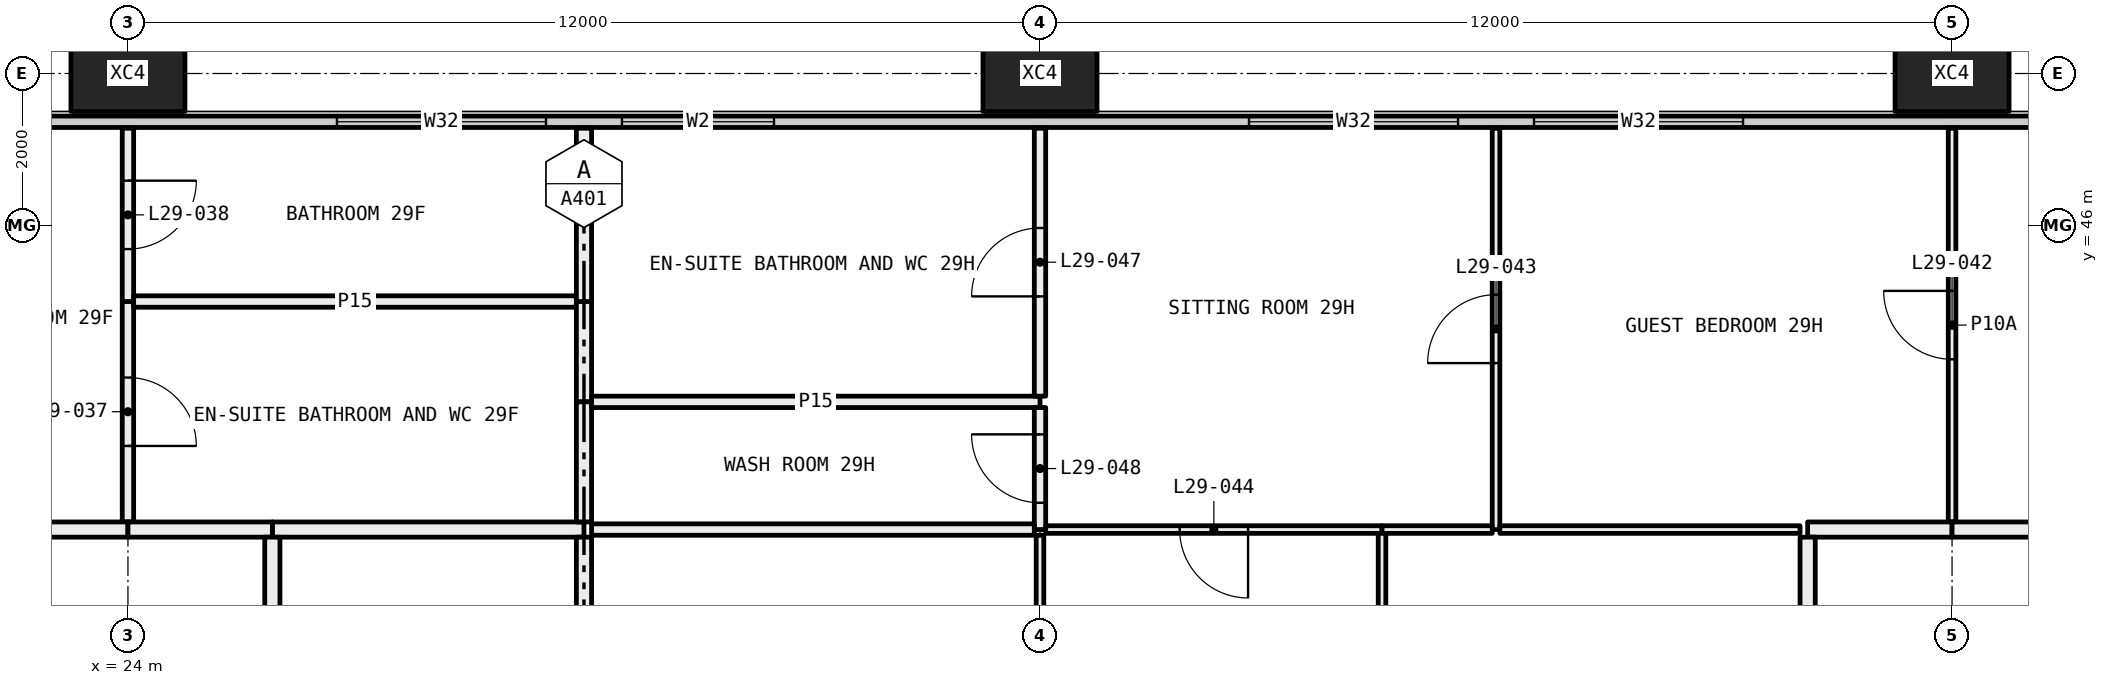
"""IFC4 building model, lengths in metres.
Left out: names, types, materials, properties, quantities, classifications, styles, units other than length and angle.
Written with IfcOpenShell. Run it as: python <this file> out.ifc"""

import sys

from ifc_helpers import new_model, si_unit, direction, frame, frame_2d, origin, origin_2d, place, context, subcontext, project, spatial, rectangle, hollow_rectangle, extrude, element, fill, save


model = new_model("IFC4")
c1 = context("Model", 3, precision=1e-05, world=origin(), true_north=direction((0.0, 1.0)))
c2 = subcontext(c1, "Body", "Model", "MODEL_VIEW")
j1 = project(units=[si_unit("LENGTHUNIT", "METRE"), si_unit("PLANEANGLEUNIT", "RADIAN")], contexts=[c1])
p1 = place(None, origin())
s1 = spatial("IfcSite", under=j1, at=p1, CompositionType="ELEMENT")
p2 = place(p1, origin())
s2 = spatial("IfcBuilding", under=s1, at=p2, CompositionType="ELEMENT")
p3 = place(p2, frame((0.0, 0.0, 113.85)))
s3 = spatial("IfcBuildingStorey", under=s2, at=p3, CompositionType="ELEMENT", Elevation=113.85)
for number, where, z_axis, x_axis in (
    (1, (24.0, 48.0, -0.4), (0.0, 0.0, 1.0), (1.0, 0.0, 0.0)),
    (2, (36.0, 48.0, -0.4), (0.0, 0.0, 1.0), (1.0, 0.0, 0.0)),
    (3, (48.0, 48.0, -0.4), (0.0, 0.0, 1.0), (1.0, 0.0, 0.0)),
):
    element("IfcColumn", number, at=place(p3, frame(where, z_axis=z_axis, x_axis=x_axis)), inside=s3, PredefinedType="COLUMN", context=c2, shape_type="SweptSolid", body=[
        extrude(hollow_rectangle(XDim=1.5, YDim=1.0, WallThickness=0.06, at=origin_2d()), origin(), (0.0, 0.0, 1.0), 3.45),
    ])
p4 = place(p3, frame((6.56, 47.365, 0.0), z_axis=(0.0, 0.0, 1.0), x_axis=(1.0, 0.0, 0.0)))
e4 = element("IfcWall", 4, at=p4, inside=s3, PredefinedType="ELEMENTEDWALL", context=c2, shape_type="SweptSolid", body=[
    extrude(rectangle(XDim=58.88, YDim=0.15, at=frame_2d((29.44, 0.0))), origin(), (0.0, 0.0, 1.0), 3.05),
])
p5 = place(p4, frame((0.44, 0.0, 0.45)))
e5 = element("IfcOpeningElement", 5, at=p5, cuts=e4, PredefinedType="OPENING", context=c2, shape_type="SweptSolid", body=[
    extrude(rectangle(XDim=4.5, YDim=2.55, at=frame_2d((2.25, 1.275))), frame((0.0, 0.085, 0.0), z_axis=(0.0, -1.0, 0.0), x_axis=(1.0, 0.0, 0.0)), (0.0, 0.0, 1.0), 0.17),
])
p6 = place(p4, frame((8.19, 0.0, 0.45)))
e6 = element("IfcOpeningElement", 6, at=p6, cuts=e4, PredefinedType="OPENING", context=c2, shape_type="SweptSolid", body=[
    extrude(rectangle(XDim=2.75, YDim=2.55, at=frame_2d((1.375, 1.275))), frame((0.0, 0.085, 0.0), z_axis=(0.0, -1.0, 0.0), x_axis=(1.0, 0.0, 0.0)), (0.0, 0.0, 1.0), 0.17),
])
p7 = place(p4, frame((11.94, 0.0, 0.45)))
e7 = element("IfcOpeningElement", 7, at=p7, cuts=e4, PredefinedType="OPENING", context=c2, shape_type="SweptSolid", body=[
    extrude(rectangle(XDim=2.75, YDim=2.55, at=frame_2d((1.375, 1.275))), frame((0.0, 0.085, 0.0), z_axis=(0.0, -1.0, 0.0), x_axis=(1.0, 0.0, 0.0)), (0.0, 0.0, 1.0), 0.17),
])
p8 = place(p4, frame((20.19, 0.0, 0.45)))
e8 = element("IfcOpeningElement", 8, at=p8, cuts=e4, PredefinedType="OPENING", context=c2, shape_type="SweptSolid", body=[
    extrude(rectangle(XDim=2.75, YDim=2.55, at=frame_2d((1.375, 1.275))), frame((0.0, 0.085, 0.0), z_axis=(0.0, -1.0, 0.0), x_axis=(1.0, 0.0, 0.0)), (0.0, 0.0, 1.0), 0.17),
])
p9 = place(p4, frame((23.94, 0.0, 0.45)))
e9 = element("IfcOpeningElement", 9, at=p9, cuts=e4, PredefinedType="OPENING", context=c2, shape_type="SweptSolid", body=[
    extrude(rectangle(XDim=2.0, YDim=2.55, at=frame_2d((1.0, 1.275))), frame((0.0, 0.085, 0.0), z_axis=(0.0, -1.0, 0.0), x_axis=(1.0, 0.0, 0.0)), (0.0, 0.0, 1.0), 0.17),
])
p10 = place(p4, frame((32.19, 0.0, 0.45)))
e10 = element("IfcOpeningElement", 10, at=p10, cuts=e4, PredefinedType="OPENING", context=c2, shape_type="SweptSolid", body=[
    extrude(rectangle(XDim=2.75, YDim=2.55, at=frame_2d((1.375, 1.275))), frame((0.0, 0.085, 0.0), z_axis=(0.0, -1.0, 0.0), x_axis=(1.0, 0.0, 0.0)), (0.0, 0.0, 1.0), 0.17),
])
p11 = place(p4, frame((35.94, 0.0, 0.45)))
e11 = element("IfcOpeningElement", 11, at=p11, cuts=e4, PredefinedType="OPENING", context=c2, shape_type="SweptSolid", body=[
    extrude(rectangle(XDim=2.75, YDim=2.55, at=frame_2d((1.375, 1.275))), frame((0.0, 0.085, 0.0), z_axis=(0.0, -1.0, 0.0), x_axis=(1.0, 0.0, 0.0)), (0.0, 0.0, 1.0), 0.17),
])
p12 = place(p4, frame((44.19, 0.0, 0.45)))
e12 = element("IfcOpeningElement", 12, at=p12, cuts=e4, PredefinedType="OPENING", context=c2, shape_type="SweptSolid", body=[
    extrude(rectangle(XDim=2.75, YDim=2.55, at=frame_2d((1.375, 1.275))), frame((0.0, 0.085, 0.0), z_axis=(0.0, -1.0, 0.0), x_axis=(1.0, 0.0, 0.0)), (0.0, 0.0, 1.0), 0.17),
])
p13 = place(p4, frame((47.94, 0.0, 0.45)))
e13 = element("IfcOpeningElement", 13, at=p13, cuts=e4, PredefinedType="OPENING", context=c2, shape_type="SweptSolid", body=[
    extrude(rectangle(XDim=2.0, YDim=2.55, at=frame_2d((1.0, 1.275))), frame((0.0, 0.085, 0.0), z_axis=(0.0, -1.0, 0.0), x_axis=(1.0, 0.0, 0.0)), (0.0, 0.0, 1.0), 0.17),
])
p14 = place(p4, frame((53.94, 0.0, 0.45)))
e14 = element("IfcOpeningElement", 14, at=p14, cuts=e4, PredefinedType="OPENING", context=c2, shape_type="SweptSolid", body=[
    extrude(rectangle(XDim=4.5, YDim=2.55, at=frame_2d((2.25, 1.275))), frame((0.0, 0.085, 0.0), z_axis=(0.0, -1.0, 0.0), x_axis=(1.0, 0.0, 0.0)), (0.0, 0.0, 1.0), 0.17),
])
p15 = place(p3, frame((24.0, 42.1, 0.0), z_axis=(0.0, 0.0, 1.0), x_axis=(0.0, 1.0, 0.0)))
e15 = element("IfcWall", 15, at=p15, inside=s3, PredefinedType="PARTITIONING", context=c2, shape_type="SweptSolid", body=[
    extrude(rectangle(XDim=2.9, YDim=0.15, at=frame_2d((1.45, 0.0))), origin(), (0.0, 0.0, 1.0), 3.05),
])
p16 = place(p15, frame((1.0, 0.0, 0.0)))
e16 = element("IfcOpeningElement", 16, at=p16, cuts=e15, PredefinedType="OPENING", context=c2, shape_type="SweptSolid", body=[
    extrude(rectangle(XDim=0.9, YDim=2.1, at=frame_2d((0.45, 1.05))), frame((0.0, 0.085, 0.0), z_axis=(0.0, -1.0, 0.0), x_axis=(1.0, 0.0, 0.0)), (0.0, 0.0, 1.0), 0.17),
])
p17 = place(p3, frame((24.0, 45.0, 0.0), z_axis=(0.0, 0.0, 1.0), x_axis=(0.0, 1.0, 0.0)))
e17 = element("IfcWall", 17, at=p17, inside=s3, PredefinedType="PARTITIONING", context=c2, shape_type="SweptSolid", body=[
    extrude(rectangle(XDim=2.28, YDim=0.15, at=frame_2d((1.14, 0.0))), origin(), (0.0, 0.0, 1.0), 3.05),
])
p18 = place(p17, frame((0.69, 0.0, 0.0)))
e18 = element("IfcOpeningElement", 18, at=p18, cuts=e17, PredefinedType="OPENING", context=c2, shape_type="SweptSolid", body=[
    extrude(rectangle(XDim=0.9, YDim=2.1, at=frame_2d((0.45, 1.05))), frame((0.0, 0.085, 0.0), z_axis=(0.0, -1.0, 0.0), x_axis=(1.0, 0.0, 0.0)), (0.0, 0.0, 1.0), 0.17),
])
p19 = place(p3, frame((18.0, 42.0, 0.0), z_axis=(0.0, 0.0, 1.0), x_axis=(1.0, 0.0, 0.0)))
e19 = element("IfcWall", 19, at=p19, inside=s3, PredefinedType="PARTITIONING", context=c2, shape_type="SweptSolid", body=[
    extrude(rectangle(XDim=6.0, YDim=0.2, at=frame_2d((3.0, 0.0))), origin(), (0.0, 0.0, 1.0), 3.05),
])
p20 = place(p3, frame((29.9, 45.0, 0.0), z_axis=(0.0, 0.0, 1.0), x_axis=(-1.0, 0.0, 0.0)))
e20 = element("IfcWall", 20, at=p20, inside=s3, PredefinedType="PARTITIONING", context=c2, shape_type="SweptSolid", body=[
    extrude(rectangle(XDim=5.825, YDim=0.15, at=frame_2d((2.913, 0.0))), origin(), (0.0, 0.0, 1.0), 3.05),
])
p21 = place(p3, frame((25.9, 42.0, 0.0), z_axis=(0.0, 0.0, 1.0), x_axis=(1.0, 0.0, 0.0)))
e21 = element("IfcWall", 21, at=p21, inside=s3, PredefinedType="PARTITIONING", context=c2, shape_type="SweptSolid", body=[
    extrude(rectangle(XDim=4.1, YDim=0.2, at=frame_2d((2.05, 0.0))), origin(), (0.0, 0.0, 1.0), 3.05),
])
p22 = place(p3, frame((30.0, 43.68, 0.0), z_axis=(0.0, 0.0, 1.0), x_axis=(0.0, 1.0, 0.0)))
e22 = element("IfcWall", 22, at=p22, inside=s3, PredefinedType="PARTITIONING", context=c2, shape_type="SweptSolid", body=[
    extrude(rectangle(XDim=1.32, YDim=0.2, at=frame_2d((0.66, 0.0))), origin(), (0.0, 0.0, 1.0), 3.05),
])
p23 = place(p3, frame((30.0, 42.1, 0.0), z_axis=(0.0, 0.0, 1.0), x_axis=(0.0, 1.0, 0.0)))
e23 = element("IfcWall", 23, at=p23, inside=s3, PredefinedType="PARTITIONING", context=c2, shape_type="SweptSolid", body=[
    extrude(rectangle(XDim=1.58, YDim=0.2, at=frame_2d((0.79, 0.0))), origin(), (0.0, 0.0, 1.0), 3.05),
])
p24 = place(p3, frame((24.0, 42.0, 0.0), z_axis=(0.0, 0.0, 1.0), x_axis=(1.0, 0.0, 0.0)))
e24 = element("IfcWall", 24, at=p24, inside=s3, PredefinedType="PARTITIONING", context=c2, shape_type="SweptSolid", body=[
    extrude(rectangle(XDim=1.9, YDim=0.2, at=frame_2d((0.95, 0.0))), origin(), (0.0, 0.0, 1.0), 3.05),
])
p25 = place(p3, frame((30.0, 45.0, 0.0), z_axis=(0.0, 0.0, 1.0), x_axis=(0.0, 1.0, 0.0)))
e25 = element("IfcWall", 25, at=p25, inside=s3, PredefinedType="PARTITIONING", context=c2, shape_type="SweptSolid", body=[
    extrude(rectangle(XDim=2.28, YDim=0.2, at=frame_2d((1.14, 0.0))), origin(), (0.0, 0.0, 1.0), 3.05),
])
p26 = place(p3, frame((30.0, 36.1, 0.0), z_axis=(0.0, 0.0, 1.0), x_axis=(0.0, 1.0, 0.0)))
e26 = element("IfcWall", 26, at=p26, inside=s3, PredefinedType="PARTITIONING", context=c2, shape_type="SweptSolid", body=[
    extrude(rectangle(XDim=5.8, YDim=0.2, at=frame_2d((2.9, 0.0))), origin(), (0.0, 0.0, 1.0), 3.05),
])
p27 = place(p3, frame((25.9, 41.9, 0.0), z_axis=(0.0, 0.0, 1.0), x_axis=(0.0, -1.0, 0.0)))
e27 = element("IfcWall", 27, at=p27, inside=s3, PredefinedType="PARTITIONING", context=c2, shape_type="SweptSolid", body=[
    extrude(rectangle(XDim=6.0, YDim=0.2, at=frame_2d((3.0, 0.0))), origin(), (0.0, 0.0, 1.0), 2.45),
])
p28 = place(p27, frame((2.55, 0.0, 0.0)))
e28 = element("IfcOpeningElement", 28, at=p28, cuts=e27, PredefinedType="OPENING", context=c2, shape_type="SweptSolid", body=[
    extrude(rectangle(XDim=0.9, YDim=2.1, at=frame_2d((0.45, 1.05))), frame((0.0, 0.11, 0.0), z_axis=(0.0, -1.0, 0.0), x_axis=(1.0, 0.0, 0.0)), (0.0, 0.0, 1.0), 0.22),
])
p29 = place(p3, frame((30.1, 43.68, 0.0), z_axis=(0.0, 0.0, 1.0), x_axis=(1.0, 0.0, 0.0)))
e29 = element("IfcWall", 29, at=p29, inside=s3, PredefinedType="PARTITIONING", context=c2, shape_type="SweptSolid", body=[
    extrude(rectangle(XDim=5.9, YDim=0.15, at=frame_2d((2.95, 0.0))), origin(), (0.0, 0.0, 1.0), 2.45),
])
p30 = place(p3, frame((36.0, 43.755, 0.0), z_axis=(0.0, 0.0, 1.0), x_axis=(0.0, 1.0, 0.0)))
e30 = element("IfcWall", 30, at=p30, inside=s3, PredefinedType="PARTITIONING", context=c2, shape_type="SweptSolid", body=[
    extrude(rectangle(XDim=3.525, YDim=0.15, at=frame_2d((1.763, 0.0))), origin(), (0.0, 0.0, 1.0), 2.45),
])
p31 = place(p30, frame((1.312, 0.0, 0.0)))
e31 = element("IfcOpeningElement", 31, at=p31, cuts=e30, PredefinedType="OPENING", context=c2, shape_type="SweptSolid", body=[
    extrude(rectangle(XDim=0.9, YDim=2.1, at=frame_2d((0.45, 1.05))), frame((0.0, 0.085, 0.0), z_axis=(0.0, -1.0, 0.0), x_axis=(1.0, 0.0, 0.0)), (0.0, 0.0, 1.0), 0.17),
])
p32 = place(p3, frame((36.0, 42.0, 0.0), z_axis=(0.0, 0.0, 1.0), x_axis=(0.0, 1.0, 0.0)))
e32 = element("IfcWall", 32, at=p32, inside=s3, PredefinedType="PARTITIONING", context=c2, shape_type="SweptSolid", body=[
    extrude(rectangle(XDim=1.605, YDim=0.15, at=frame_2d((0.802, 0.0))), origin(), (0.0, 0.0, 1.0), 2.45),
])
p33 = place(p32, frame((0.353, 0.0, 0.0)))
e33 = element("IfcOpeningElement", 33, at=p33, cuts=e32, PredefinedType="OPENING", context=c2, shape_type="SweptSolid", body=[
    extrude(rectangle(XDim=0.9, YDim=2.1, at=frame_2d((0.45, 1.05))), frame((0.0, 0.085, 0.0), z_axis=(0.0, -1.0, 0.0), x_axis=(1.0, 0.0, 0.0)), (0.0, 0.0, 1.0), 0.17),
])
p34 = place(p3, frame((30.1, 42.0, 0.0), z_axis=(0.0, 0.0, 1.0), x_axis=(1.0, 0.0, 0.0)))
e34 = element("IfcWall", 34, at=p34, inside=s3, PredefinedType="PARTITIONING", context=c2, shape_type="SweptSolid", body=[
    extrude(rectangle(XDim=5.825, YDim=0.15, at=frame_2d((2.913, 0.0))), origin(), (0.0, 0.0, 1.0), 2.45),
])
p35 = place(p3, frame((42.0, 42.0, 0.0), z_axis=(0.0, 0.0, 1.0), x_axis=(0.0, 1.0, 0.0)))
e35 = element("IfcWall", 35, at=p35, inside=s3, PredefinedType="PARTITIONING", context=c2, shape_type="SweptSolid", body=[
    extrude(rectangle(XDim=5.28, YDim=0.1, at=frame_2d((2.64, 0.0))), origin(), (0.0, 0.0, 1.0), 3.05),
])
p36 = place(p35, frame((2.19, 0.0, 0.0)))
e36 = element("IfcOpeningElement", 36, at=p36, cuts=e35, PredefinedType="OPENING", context=c2, shape_type="SweptSolid", body=[
    extrude(rectangle(XDim=0.9, YDim=2.1, at=frame_2d((0.45, 1.05))), frame((0.0, 0.06, 0.0), z_axis=(0.0, -1.0, 0.0), x_axis=(1.0, 0.0, 0.0)), (0.0, 0.0, 1.0), 0.12),
])
p37 = place(p3, frame((36.075, 42.0, 0.0), z_axis=(0.0, 0.0, 1.0), x_axis=(1.0, 0.0, 0.0)))
e37 = element("IfcWall", 37, at=p37, inside=s3, PredefinedType="PARTITIONING", context=c2, shape_type="SweptSolid", body=[
    extrude(rectangle(XDim=4.425, YDim=0.1, at=frame_2d((2.212, 0.0))), origin(), (0.0, 0.0, 1.0), 2.45),
])
p38 = place(p37, frame((1.762, 0.0, 0.0)))
e38 = element("IfcOpeningElement", 38, at=p38, cuts=e37, PredefinedType="OPENING", context=c2, shape_type="SweptSolid", body=[
    extrude(rectangle(XDim=0.9, YDim=2.1, at=frame_2d((0.45, 1.05))), frame((0.0, 0.06, 0.0), z_axis=(0.0, -1.0, 0.0), x_axis=(1.0, 0.0, 0.0)), (0.0, 0.0, 1.0), 0.12),
])
p39 = place(p3, frame((40.5, 42.0, 0.0), z_axis=(0.0, 0.0, 1.0), x_axis=(1.0, 0.0, 0.0)))
e39 = element("IfcWall", 39, at=p39, inside=s3, PredefinedType="PARTITIONING", context=c2, shape_type="SweptSolid", body=[
    extrude(rectangle(XDim=1.45, YDim=0.1, at=frame_2d((0.725, 0.0))), origin(), (0.0, 0.0, 1.0), 3.05),
])
p40 = place(p3, frame((48.0, 42.1, 0.0), z_axis=(0.0, 0.0, 1.0), x_axis=(0.0, 1.0, 0.0)))
e40 = element("IfcWall", 40, at=p40, inside=s3, PredefinedType="PARTITIONING", context=c2, shape_type="SweptSolid", body=[
    extrude(rectangle(XDim=5.18, YDim=0.1, at=frame_2d((2.59, 0.0))), origin(), (0.0, 0.0, 1.0), 3.05),
])
p41 = place(p40, frame((2.14, 0.0, 0.0)))
e41 = element("IfcOpeningElement", 41, at=p41, cuts=e40, PredefinedType="OPENING", context=c2, shape_type="SweptSolid", body=[
    extrude(rectangle(XDim=0.9, YDim=2.1, at=frame_2d((0.45, 1.05))), frame((0.0, 0.06, 0.0), z_axis=(0.0, -1.0, 0.0), x_axis=(1.0, 0.0, 0.0)), (0.0, 0.0, 1.0), 0.12),
])
p42 = place(p3, frame((42.05, 42.0, 0.0), z_axis=(0.0, 0.0, 1.0), x_axis=(1.0, 0.0, 0.0)))
e42 = element("IfcWall", 42, at=p42, inside=s3, PredefinedType="PARTITIONING", context=c2, shape_type="SweptSolid", body=[
    extrude(rectangle(XDim=3.95, YDim=0.1, at=frame_2d((1.975, 0.0))), origin(), (0.0, 0.0, 1.0), 3.05),
])
p43 = place(p3, frame((46.1, 42.0, 0.0), z_axis=(0.0, 0.0, 1.0), x_axis=(1.0, 0.0, 0.0)))
e43 = element("IfcWall", 43, at=p43, inside=s3, PredefinedType="PARTITIONING", context=c2, shape_type="SweptSolid", body=[
    extrude(rectangle(XDim=1.9, YDim=0.2, at=frame_2d((0.95, 0.0))), origin(), (0.0, 0.0, 1.0), 3.05),
])
p44 = place(p3, frame((48.0, 42.0, 0.0), z_axis=(0.0, 0.0, 1.0), x_axis=(1.0, 0.0, 0.0)))
e44 = element("IfcWall", 44, at=p44, inside=s3, PredefinedType="PARTITIONING", context=c2, shape_type="SweptSolid", body=[
    extrude(rectangle(XDim=6.0, YDim=0.2, at=frame_2d((3.0, 0.0))), origin(), (0.0, 0.0, 1.0), 3.05),
])
p45 = place(p3, frame((36.0, 36.75, 0.0), z_axis=(0.0, 0.0, 1.0), x_axis=(0.0, 1.0, 0.0)))
e45 = element("IfcWall", 45, at=p45, inside=s3, PredefinedType="PARTITIONING", context=c2, shape_type="SweptSolid", body=[
    extrude(rectangle(XDim=5.175, YDim=0.1, at=frame_2d((2.587, 0.0))), origin(), (0.0, 0.0, 1.0), 2.45),
])
p46 = place(p45, frame((2.137, 0.0, 0.0)))
e46 = element("IfcOpeningElement", 46, at=p46, cuts=e45, PredefinedType="OPENING", context=c2, shape_type="SweptSolid", body=[
    extrude(rectangle(XDim=0.9, YDim=2.1, at=frame_2d((0.45, 1.05))), frame((0.0, 0.06, 0.0), z_axis=(0.0, -1.0, 0.0), x_axis=(1.0, 0.0, 0.0)), (0.0, 0.0, 1.0), 0.12),
])
p47 = place(p3, frame((40.5, 36.1, 0.0), z_axis=(0.0, 0.0, 1.0), x_axis=(0.0, 1.0, 0.0)))
e47 = element("IfcWall", 47, at=p47, inside=s3, PredefinedType="PARTITIONING", context=c2, shape_type="SweptSolid", body=[
    extrude(rectangle(XDim=5.85, YDim=0.1, at=frame_2d((2.925, 0.0))), origin(), (0.0, 0.0, 1.0), 3.05),
])
p48 = place(p47, frame((2.475, 0.0, 0.0)))
e48 = element("IfcOpeningElement", 48, at=p48, cuts=e47, PredefinedType="OPENING", context=c2, shape_type="SweptSolid", body=[
    extrude(rectangle(XDim=0.9, YDim=2.1, at=frame_2d((0.45, 1.05))), frame((0.0, 0.06, 0.0), z_axis=(0.0, -1.0, 0.0), x_axis=(1.0, 0.0, 0.0)), (0.0, 0.0, 1.0), 0.12),
])
p49 = place(p3, frame((46.1, 36.1, 0.0), z_axis=(0.0, 0.0, 1.0), x_axis=(0.0, 1.0, 0.0)))
e49 = element("IfcWall", 49, at=p49, inside=s3, PredefinedType="PARTITIONING", context=c2, shape_type="SweptSolid", body=[
    extrude(rectangle(XDim=5.8, YDim=0.2, at=frame_2d((2.9, 0.0))), origin(), (0.0, 0.0, 1.0), 3.05),
])
p50 = place(p8, origin())
e50 = element("IfcWindow", 50, at=p50, inside=s3, PartitioningType="SINGLE_PANEL", PredefinedType="WINDOW", context=c2, shape_type="SweptSolid", body=[
    extrude(rectangle(XDim=2.75, YDim=2.55, at=frame_2d((1.375, 1.275))), frame((0.0, 0.03, 0.0), z_axis=(0.0, -1.0, 0.0), x_axis=(1.0, 0.0, 0.0)), (0.0, 0.0, 1.0), 0.06),
])
fill(e8, e50)
p51 = place(p9, origin())
e51 = element("IfcWindow", 51, at=p51, inside=s3, PartitioningType="SINGLE_PANEL", PredefinedType="WINDOW", context=c2, shape_type="SweptSolid", body=[
    extrude(rectangle(XDim=2.0, YDim=2.55, at=frame_2d((1.0, 1.275))), frame((0.0, 0.03, 0.0), z_axis=(0.0, -1.0, 0.0), x_axis=(1.0, 0.0, 0.0)), (0.0, 0.0, 1.0), 0.06),
])
fill(e9, e51)
p52 = place(p10, origin())
e52 = element("IfcWindow", 52, at=p52, inside=s3, PartitioningType="SINGLE_PANEL", PredefinedType="WINDOW", context=c2, shape_type="SweptSolid", body=[
    extrude(rectangle(XDim=2.75, YDim=2.55, at=frame_2d((1.375, 1.275))), frame((0.0, 0.03, 0.0), z_axis=(0.0, -1.0, 0.0), x_axis=(1.0, 0.0, 0.0)), (0.0, 0.0, 1.0), 0.06),
])
fill(e10, e52)
p53 = place(p11, origin())
e53 = element("IfcWindow", 53, at=p53, inside=s3, PartitioningType="SINGLE_PANEL", PredefinedType="WINDOW", context=c2, shape_type="SweptSolid", body=[
    extrude(rectangle(XDim=2.75, YDim=2.55, at=frame_2d((1.375, 1.275))), frame((0.0, 0.03, 0.0), z_axis=(0.0, -1.0, 0.0), x_axis=(1.0, 0.0, 0.0)), (0.0, 0.0, 1.0), 0.06),
])
fill(e11, e53)
p54 = place(p16, frame((0.9, 0.0, 0.0), x_axis=(-1.0, 0.0, 0.0)))
e54 = element("IfcDoor", 54, at=p54, inside=s3, OperationType="SINGLE_SWING_LEFT", PredefinedType="DOOR", context=c2, shape_type="SweptSolid", body=[
    extrude(rectangle(XDim=0.9, YDim=2.1, at=frame_2d((0.45, 1.05))), frame((0.0, 0.025, 0.0), z_axis=(0.0, -1.0, 0.0), x_axis=(1.0, 0.0, 0.0)), (0.0, 0.0, 1.0), 0.05),
])
fill(e16, e54)
p55 = place(p18, frame((0.9, 0.0, 0.0), x_axis=(-1.0, 0.0, 0.0)))
e55 = element("IfcDoor", 55, at=p55, inside=s3, OperationType="SINGLE_SWING_RIGHT", PredefinedType="DOOR", context=c2, shape_type="SweptSolid", body=[
    extrude(rectangle(XDim=0.9, YDim=2.1, at=frame_2d((0.45, 1.05))), frame((0.0, 0.025, 0.0), z_axis=(0.0, -1.0, 0.0), x_axis=(1.0, 0.0, 0.0)), (0.0, 0.0, 1.0), 0.05),
])
fill(e18, e55)
p56 = place(p41, origin())
e56 = element("IfcDoor", 56, at=p56, inside=s3, OperationType="SINGLE_SWING_LEFT", PredefinedType="DOOR", context=c2, shape_type="SweptSolid", body=[
    extrude(rectangle(XDim=0.9, YDim=2.1, at=frame_2d((0.45, 1.05))), frame((0.0, 0.025, 0.0), z_axis=(0.0, -1.0, 0.0), x_axis=(1.0, 0.0, 0.0)), (0.0, 0.0, 1.0), 0.05),
])
fill(e41, e56)
p57 = place(p36, origin())
e57 = element("IfcDoor", 57, at=p57, inside=s3, OperationType="SINGLE_SWING_RIGHT", PredefinedType="DOOR", context=c2, shape_type="SweptSolid", body=[
    extrude(rectangle(XDim=0.9, YDim=2.1, at=frame_2d((0.45, 1.05))), frame((0.0, 0.025, 0.0), z_axis=(0.0, -1.0, 0.0), x_axis=(1.0, 0.0, 0.0)), (0.0, 0.0, 1.0), 0.05),
])
fill(e36, e57)
p58 = place(p38, frame((0.9, 0.0, 0.0), x_axis=(-1.0, 0.0, 0.0)))
e58 = element("IfcDoor", 58, at=p58, inside=s3, OperationType="SINGLE_SWING_RIGHT", PredefinedType="DOOR", context=c2, shape_type="SweptSolid", body=[
    extrude(rectangle(XDim=0.9, YDim=2.1, at=frame_2d((0.45, 1.05))), frame((0.0, 0.025, 0.0), z_axis=(0.0, -1.0, 0.0), x_axis=(1.0, 0.0, 0.0)), (0.0, 0.0, 1.0), 0.05),
])
fill(e38, e58)
p59 = place(p31, origin())
e59 = element("IfcDoor", 59, at=p59, inside=s3, OperationType="SINGLE_SWING_RIGHT", PredefinedType="DOOR", context=c2, shape_type="SweptSolid", body=[
    extrude(rectangle(XDim=0.9, YDim=2.1, at=frame_2d((0.45, 1.05))), frame((0.0, 0.025, 0.0), z_axis=(0.0, -1.0, 0.0), x_axis=(1.0, 0.0, 0.0)), (0.0, 0.0, 1.0), 0.05),
])
fill(e31, e59)
p60 = place(p33, origin())
e60 = element("IfcDoor", 60, at=p60, inside=s3, OperationType="SINGLE_SWING_LEFT", PredefinedType="DOOR", context=c2, shape_type="SweptSolid", body=[
    extrude(rectangle(XDim=0.9, YDim=2.1, at=frame_2d((0.45, 1.05))), frame((0.0, 0.025, 0.0), z_axis=(0.0, -1.0, 0.0), x_axis=(1.0, 0.0, 0.0)), (0.0, 0.0, 1.0), 0.05),
])
fill(e33, e60)
save(model, sys.argv[1])
